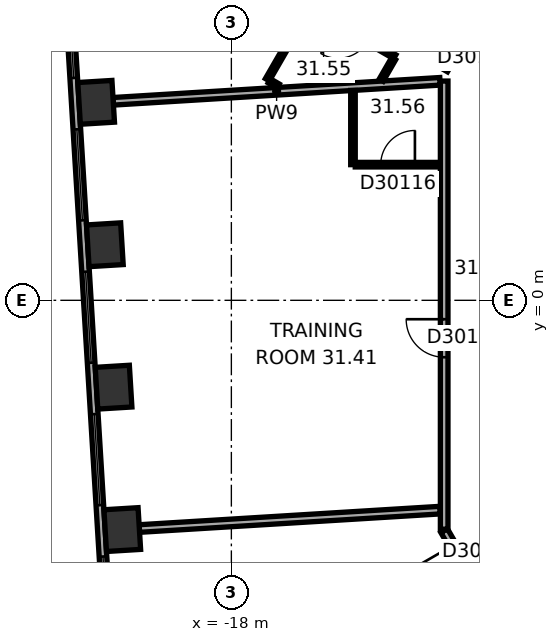
"""IFC4 building model, lengths in metres.
Left out: names, types, materials, properties, quantities, classifications, styles, units other than length and angle.
Written with IfcOpenShell. Run it as: python <this file> out.ifc"""

import sys

from ifc_helpers import new_model, si_unit, direction, frame, frame_2d, origin, origin_2d, place, context, subcontext, project, spatial, rectangle, extrude, element, fill, save


model = new_model("IFC4")
c1 = context("Model", 3, precision=1e-05, world=origin(), true_north=direction((0.0, 1.0)))
c2 = subcontext(c1, "Body", "Model", "MODEL_VIEW")
j1 = project(units=[si_unit("LENGTHUNIT", "METRE"), si_unit("PLANEANGLEUNIT", "RADIAN")], contexts=[c1])
p1 = place(None, origin())
s1 = spatial("IfcSite", under=j1, at=p1, CompositionType="ELEMENT")
p2 = place(p1, origin())
s2 = spatial("IfcBuilding", under=s1, at=p2, CompositionType="ELEMENT")
p3 = place(p2, frame((0.0, 0.0, 128.1)))
s3 = spatial("IfcBuildingStorey", under=s2, at=p3, CompositionType="ELEMENT", Elevation=128.1)
for number, where, z_axis, x_axis in (
    (1, (-21.558, 5.209, 0.0), (0.0, 0.0, 1.0), (0.061, -0.998, 0.0)),
    (2, (-21.329, 1.462, 0.0), (0.0, 0.0, 1.0), (0.061, -0.998, 0.0)),
    (3, (-21.1, -2.285, 0.0), (0.0, 0.0, 1.0), (0.061, -0.998, 0.0)),
    (4, (-20.871, -6.032, 0.0), (0.0, 0.0, 1.0), (0.061, -0.998, 0.0)),
):
    element("IfcColumn", number, at=place(p3, frame(where, z_axis=z_axis, x_axis=x_axis)), inside=s3, PredefinedType="COLUMN", context=c2, shape_type="SweptSolid", body=[
        extrude(rectangle(XDim=1.1, YDim=0.9, at=origin_2d()), origin(), (0.0, 0.0, 1.0), 3.7),
    ])
p4 = place(p3, frame((-22.375, 9.557, 0.0), z_axis=(0.0, 0.0, 1.0), x_axis=(0.061036015339, -0.998135564356, 0.0)))
e5 = element("IfcWall", 5, at=p4, inside=s3, PredefinedType="STANDARD", context=c2, shape_type="SweptSolid", body=[
    extrude(rectangle(XDim=20.044, YDim=0.2, at=frame_2d((10.022, 0.0))), origin(), (0.0, 0.0, 1.0), 3.7),
])
p5 = place(p4, frame((1.313, 0.0, 0.9)))
e6 = element("IfcOpeningElement", 6, at=p5, cuts=e5, PredefinedType="OPENING", context=c2, shape_type="SweptSolid", body=[
    extrude(rectangle(XDim=2.4, YDim=2.0, at=frame_2d((1.2, 1.0))), frame((0.0, 0.11, 0.0), z_axis=(0.0, -1.0, 0.0), x_axis=(1.0, 0.0, 0.0)), (0.0, 0.0, 1.0), 0.22),
])
p6 = place(p4, frame((5.067, 0.0, 0.9)))
e7 = element("IfcOpeningElement", 7, at=p6, cuts=e5, PredefinedType="OPENING", context=c2, shape_type="SweptSolid", body=[
    extrude(rectangle(XDim=2.4, YDim=2.0, at=frame_2d((1.2, 1.0))), frame((0.0, 0.11, 0.0), z_axis=(0.0, -1.0, 0.0), x_axis=(1.0, 0.0, 0.0)), (0.0, 0.0, 1.0), 0.22),
])
p7 = place(p4, frame((8.821, 0.0, 0.9)))
e8 = element("IfcOpeningElement", 8, at=p7, cuts=e5, PredefinedType="OPENING", context=c2, shape_type="SweptSolid", body=[
    extrude(rectangle(XDim=2.4, YDim=2.0, at=frame_2d((1.2, 1.0))), frame((0.0, 0.11, 0.0), z_axis=(0.0, -1.0, 0.0), x_axis=(1.0, 0.0, 0.0)), (0.0, 0.0, 1.0), 0.22),
])
p8 = place(p4, frame((12.575, 0.0, 0.9)))
e9 = element("IfcOpeningElement", 9, at=p8, cuts=e5, PredefinedType="OPENING", context=c2, shape_type="SweptSolid", body=[
    extrude(rectangle(XDim=2.4, YDim=2.0, at=frame_2d((1.2, 1.0))), frame((0.0, 0.11, 0.0), z_axis=(0.0, -1.0, 0.0), x_axis=(1.0, 0.0, 0.0)), (0.0, 0.0, 1.0), 0.22),
])
p9 = place(p4, frame((16.329, 0.0, 0.9)))
e10 = element("IfcOpeningElement", 10, at=p9, cuts=e5, PredefinedType="OPENING", context=c2, shape_type="SweptSolid", body=[
    extrude(rectangle(XDim=2.4, YDim=2.0, at=frame_2d((1.2, 1.0))), frame((0.0, 0.11, 0.0), z_axis=(0.0, -1.0, 0.0), x_axis=(1.0, 0.0, 0.0)), (0.0, 0.0, 1.0), 0.22),
])
p10 = place(p3, frame((-21.109, 5.237, 0.0), z_axis=(0.0, 0.0, 1.0), x_axis=(0.998135264293, 0.061040922131, 0.0)))
e11 = element("IfcWall", 11, at=p10, inside=s3, PredefinedType="PARTITIONING", context=c2, shape_type="SweptSolid", body=[
    extrude(rectangle(XDim=8.615, YDim=0.2, at=frame_2d((4.308, 0.0))), origin(), (0.0, 0.0, 1.0), 3.42),
])
p11 = place(p3, frame((-20.421, -6.005, 0.0), z_axis=(0.0, 0.0, 1.0), x_axis=(0.998134865741, 0.061047438866, 0.0)))
e12 = element("IfcWall", 12, at=p11, inside=s3, PredefinedType="PARTITIONING", context=c2, shape_type="SweptSolid", body=[
    extrude(rectangle(XDim=7.927, YDim=0.2, at=frame_2d((3.963, 0.0))), origin(), (0.0, 0.0, 1.0), 2.87),
])
p12 = place(p3, frame((-17.052, 5.804, 0.0), z_axis=(0.0, 0.0, 1.0), x_axis=(0.50002983664, 0.866008176907, 0.0)))
e13 = element("IfcWall", 13, at=p12, inside=s3, PredefinedType="PARTITIONING", context=c2, shape_type="SweptSolid", body=[
    extrude(rectangle(XDim=2.2, YDim=0.12, at=frame_2d((1.1, 0.0))), origin(), (0.0, 0.0, 1.0), 3.42),
])
p13 = place(p3, frame((-16.769, 5.64, 0.0), z_axis=(0.0, 0.0, 1.0), x_axis=(-0.865926680471, 0.500170954823, 0.0)))
e14 = element("IfcWall", 14, at=p13, inside=s3, PredefinedType="PARTITIONING", context=c2, shape_type="SweptSolid", body=[
    extrude(rectangle(XDim=0.267, YDim=0.12, at=frame_2d((0.134, 0.0))), origin(), (0.0, 0.0, 1.0), 3.42),
])
p14 = place(p3, frame((-15.9, 7.679, 0.0), z_axis=(0.0, 0.0, 1.0), x_axis=(0.866022320763, -0.500005339912, 0.0)))
e15 = element("IfcWall", 15, at=p14, inside=s3, PredefinedType="PARTITIONING", context=c2, shape_type="SweptSolid", body=[
    extrude(rectangle(XDim=2.54, YDim=0.12, at=frame_2d((1.27, 0.0))), origin(), (0.0, 0.0, 1.0), 3.42),
])
p15 = place(p14, frame((0.82, 0.0, 0.0)))
e16 = element("IfcOpeningElement", 16, at=p15, cuts=e15, PredefinedType="OPENING", context=c2, shape_type="SweptSolid", body=[
    extrude(rectangle(XDim=0.9, YDim=2.1, at=frame_2d((0.45, 1.05))), frame((0.0, 0.07, 0.0), z_axis=(0.0, -1.0, 0.0), x_axis=(1.0, 0.0, 0.0)), (0.0, 0.0, 1.0), 0.14),
])
p16 = place(p3, frame((-14.8, 3.569, 0.0), z_axis=(0.0, 0.0, 1.0), x_axis=(0.0, 1.0, 0.0)))
e17 = element("IfcWall", 17, at=p16, inside=s3, PredefinedType="PARTITIONING", context=c2, shape_type="SweptSolid", body=[
    extrude(rectangle(XDim=1.953, YDim=0.12, at=frame_2d((0.977, 0.0))), origin(), (0.0, 0.0, 1.0), 3.42),
])
p17 = place(p3, frame((-13.731, 6.357, 0.0), z_axis=(0.0, 0.0, 1.0), x_axis=(-0.500090215447, -0.865973311606, 0.0)))
e18 = element("IfcWall", 18, at=p17, inside=s3, PredefinedType="PARTITIONING", context=c2, shape_type="SweptSolid", body=[
    extrude(rectangle(XDim=0.651, YDim=0.12, at=frame_2d((0.326, 0.0))), origin(), (0.0, 0.0, 1.0), 3.42),
])
p18 = place(p3, frame((-12.5, 3.569, 0.0), z_axis=(0.0, 0.0, 1.0), x_axis=(-1.0, 0.0, 0.0)))
e19 = element("IfcWall", 19, at=p18, inside=s3, PredefinedType="PARTITIONING", context=c2, shape_type="SweptSolid", body=[
    extrude(rectangle(XDim=2.24, YDim=0.12, at=frame_2d((1.12, 0.0))), origin(), (0.0, 0.0, 1.0), 3.42),
])
p19 = place(p18, frame((0.67, 0.0, 0.0)))
e20 = element("IfcOpeningElement", 20, at=p19, cuts=e19, PredefinedType="OPENING", context=c2, shape_type="SweptSolid", body=[
    extrude(rectangle(XDim=0.9, YDim=2.1, at=frame_2d((0.45, 1.05))), frame((0.0, 0.07, 0.0), z_axis=(0.0, -1.0, 0.0), x_axis=(1.0, 0.0, 0.0)), (0.0, 0.0, 1.0), 0.14),
])
p20 = place(p3, frame((-12.4, -6.062, 0.0), z_axis=(0.0, 0.0, 1.0), x_axis=(0.500022797313, -0.86601224135, 0.0)))
e21 = element("IfcWall", 21, at=p20, inside=s3, PredefinedType="PARTITIONING", context=c2, shape_type="SweptSolid", body=[
    extrude(rectangle(XDim=1.9, YDim=0.2, at=frame_2d((0.95, 0.0))), origin(), (0.0, 0.0, 1.0), 3.42),
])
p21 = place(p20, frame((0.45, 0.0, 0.0)))
e22 = element("IfcOpeningElement", 22, at=p21, cuts=e21, PredefinedType="OPENING", context=c2, shape_type="SweptSolid", body=[
    extrude(rectangle(XDim=1.0, YDim=2.1, at=frame_2d((0.5, 1.05))), frame((0.0, 0.11, 0.0), z_axis=(0.0, -1.0, 0.0), x_axis=(1.0, 0.0, 0.0)), (0.0, 0.0, 1.0), 0.22),
])
p22 = place(p3, frame((-12.4, 5.769, 0.0), z_axis=(0.0, 0.0, 1.0), x_axis=(0.0, -1.0, 0.0)))
e23 = element("IfcWall", 23, at=p22, inside=s3, PredefinedType="PARTITIONING", context=c2, shape_type="SweptSolid", body=[
    extrude(rectangle(XDim=11.792, YDim=0.2, at=frame_2d((5.896, 0.0))), origin(), (0.0, 0.0, 1.0), 3.42),
])
p23 = place(p22, frame((6.267, 0.0, 0.0)))
e24 = element("IfcOpeningElement", 24, at=p23, cuts=e23, PredefinedType="OPENING", context=c2, shape_type="SweptSolid", body=[
    extrude(rectangle(XDim=1.0, YDim=2.1, at=frame_2d((0.5, 1.05))), frame((0.0, 0.11, 0.0), z_axis=(0.0, -1.0, 0.0), x_axis=(1.0, 0.0, 0.0)), (0.0, 0.0, 1.0), 0.22),
])
p24 = place(p3, frame((-11.45, 7.708, 0.0), z_axis=(0.0, 0.0, 1.0), x_axis=(-0.500022797313, -0.86601224135, 0.0)))
e25 = element("IfcWall", 25, at=p24, inside=s3, PredefinedType="PARTITIONING", context=c2, shape_type="SweptSolid", body=[
    extrude(rectangle(XDim=1.9, YDim=0.2, at=frame_2d((0.95, 0.0))), origin(), (0.0, 0.0, 1.0), 3.42),
])
p25 = place(p24, frame((0.712, 0.0, 0.0)))
e26 = element("IfcOpeningElement", 26, at=p25, cuts=e25, PredefinedType="OPENING", context=c2, shape_type="SweptSolid", body=[
    extrude(rectangle(XDim=1.0, YDim=2.1, at=frame_2d((0.5, 1.05))), frame((0.0, 0.11, 0.0), z_axis=(0.0, -1.0, 0.0), x_axis=(1.0, 0.0, 0.0)), (0.0, 0.0, 1.0), 0.22),
])
p26 = place(p5, origin())
e27 = element("IfcWindow", 27, at=p26, inside=s3, PartitioningType="SINGLE_PANEL", PredefinedType="WINDOW", context=c2, shape_type="SweptSolid", body=[
    extrude(rectangle(XDim=2.4, YDim=2.0, at=frame_2d((1.2, 1.0))), frame((0.0, 0.03, 0.0), z_axis=(0.0, -1.0, 0.0), x_axis=(1.0, 0.0, 0.0)), (0.0, 0.0, 1.0), 0.06),
])
fill(e6, e27)
p27 = place(p6, origin())
e28 = element("IfcWindow", 28, at=p27, inside=s3, PartitioningType="SINGLE_PANEL", PredefinedType="WINDOW", context=c2, shape_type="SweptSolid", body=[
    extrude(rectangle(XDim=2.4, YDim=2.0, at=frame_2d((1.2, 1.0))), frame((0.0, 0.03, 0.0), z_axis=(0.0, -1.0, 0.0), x_axis=(1.0, 0.0, 0.0)), (0.0, 0.0, 1.0), 0.06),
])
fill(e7, e28)
p28 = place(p7, origin())
e29 = element("IfcWindow", 29, at=p28, inside=s3, PartitioningType="SINGLE_PANEL", PredefinedType="WINDOW", context=c2, shape_type="SweptSolid", body=[
    extrude(rectangle(XDim=2.4, YDim=2.0, at=frame_2d((1.2, 1.0))), frame((0.0, 0.03, 0.0), z_axis=(0.0, -1.0, 0.0), x_axis=(1.0, 0.0, 0.0)), (0.0, 0.0, 1.0), 0.06),
])
fill(e8, e29)
p29 = place(p8, origin())
e30 = element("IfcWindow", 30, at=p29, inside=s3, PartitioningType="SINGLE_PANEL", PredefinedType="WINDOW", context=c2, shape_type="SweptSolid", body=[
    extrude(rectangle(XDim=2.4, YDim=2.0, at=frame_2d((1.2, 1.0))), frame((0.0, 0.03, 0.0), z_axis=(0.0, -1.0, 0.0), x_axis=(1.0, 0.0, 0.0)), (0.0, 0.0, 1.0), 0.06),
])
fill(e9, e30)
p30 = place(p9, origin())
e31 = element("IfcWindow", 31, at=p30, inside=s3, PartitioningType="SINGLE_PANEL", PredefinedType="WINDOW", context=c2, shape_type="SweptSolid", body=[
    extrude(rectangle(XDim=2.4, YDim=2.0, at=frame_2d((1.2, 1.0))), frame((0.0, 0.03, 0.0), z_axis=(0.0, -1.0, 0.0), x_axis=(1.0, 0.0, 0.0)), (0.0, 0.0, 1.0), 0.06),
])
fill(e10, e31)
p31 = place(p25, origin())
e32 = element("IfcDoor", 32, at=p31, inside=s3, OperationType="SINGLE_SWING_LEFT", PredefinedType="DOOR", context=c2, shape_type="SweptSolid", body=[
    extrude(rectangle(XDim=1.0, YDim=2.1, at=frame_2d((0.5, 1.05))), frame((0.0, 0.025, 0.0), z_axis=(0.0, -1.0, 0.0), x_axis=(1.0, 0.0, 0.0)), (0.0, 0.0, 1.0), 0.05),
])
fill(e26, e32)
p32 = place(p23, origin())
e33 = element("IfcDoor", 33, at=p32, inside=s3, OperationType="SINGLE_SWING_LEFT", PredefinedType="DOOR", context=c2, shape_type="SweptSolid", body=[
    extrude(rectangle(XDim=1.0, YDim=2.1, at=frame_2d((0.5, 1.05))), frame((0.0, 0.025, 0.0), z_axis=(0.0, -1.0, 0.0), x_axis=(1.0, 0.0, 0.0)), (0.0, 0.0, 1.0), 0.05),
])
fill(e24, e33)
p33 = place(p19, origin())
e34 = element("IfcDoor", 34, at=p33, inside=s3, OperationType="SINGLE_SWING_LEFT", PredefinedType="DOOR", context=c2, shape_type="SweptSolid", body=[
    extrude(rectangle(XDim=0.9, YDim=2.1, at=frame_2d((0.45, 1.05))), frame((0.0, 0.025, 0.0), z_axis=(0.0, -1.0, 0.0), x_axis=(1.0, 0.0, 0.0)), (0.0, 0.0, 1.0), 0.05),
])
fill(e20, e34)
p34 = place(p21, origin())
e35 = element("IfcDoor", 35, at=p34, inside=s3, OperationType="SINGLE_SWING_LEFT", PredefinedType="DOOR", context=c2, shape_type="SweptSolid", body=[
    extrude(rectangle(XDim=1.0, YDim=2.1, at=frame_2d((0.5, 1.05))), frame((0.0, 0.025, 0.0), z_axis=(0.0, -1.0, 0.0), x_axis=(1.0, 0.0, 0.0)), (0.0, 0.0, 1.0), 0.05),
])
fill(e22, e35)
save(model, sys.argv[1])
